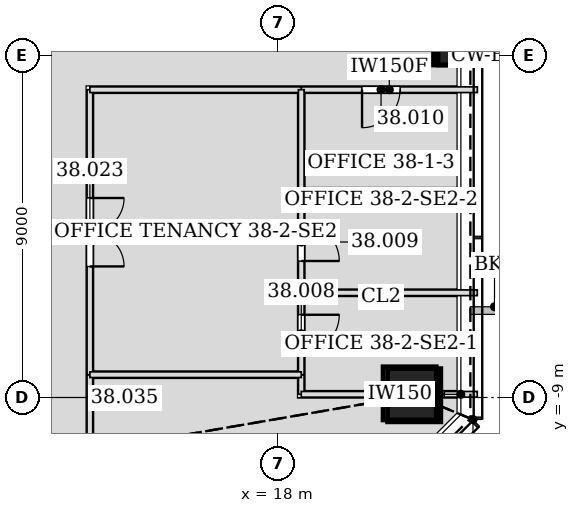
"""IFC4 building model, lengths in metres.
Left out: names, types, materials, properties, quantities, classifications, styles, units other than length and angle.
Written with IfcOpenShell. Run it as: python <this file> out.ifc"""

import sys

from ifc_helpers import new_model, si_unit, direction, frame, frame_2d, origin, origin_2d, place, context, subcontext, project, spatial, rectangle, hollow_rectangle, extrude, element, fill, save


model = new_model("IFC4")
c1 = context("Model", 3, precision=1e-05, world=origin(), true_north=direction((0.0, 1.0)))
c2 = subcontext(c1, "Body", "Model", "MODEL_VIEW")
j1 = project(units=[si_unit("LENGTHUNIT", "METRE"), si_unit("PLANEANGLEUNIT", "RADIAN")], contexts=[c1])
p1 = place(None, origin())
s1 = spatial("IfcSite", under=j1, at=p1, CompositionType="ELEMENT")
p2 = place(p1, origin())
s2 = spatial("IfcBuilding", under=s1, at=p2, CompositionType="ELEMENT")
p3 = place(p2, frame((0.0, 0.0, 168.0)))
s3 = spatial("IfcBuildingStorey", under=s2, at=p3, CompositionType="ELEMENT", Elevation=168.0)
p4 = place(p3, frame((21.584, -8.94, 0.0), z_axis=(-0.028237674468, 0.01173664659, 0.999532333078), x_axis=(-0.38380575713, -0.923413851312, 0.0)))
e1 = element("IfcColumn", 1, at=p4, inside=s3, PredefinedType="COLUMN", context=c2, shape_type="SweptSolid", body=[
    extrude(hollow_rectangle(XDim=1.4, YDim=1.4, WallThickness=0.065, at=origin_2d()), origin(), (0.0, 0.0, 1.0), 4.202),
])
p5 = place(p3, frame((22.462, 0.0, 0.0), z_axis=(-0.028239619523, 0.0, 0.999601182417), x_axis=(0.0, -1.0, 0.0)))
e2 = element("IfcColumn", 2, at=p5, inside=s3, PredefinedType="COLUMN", context=c2, shape_type="SweptSolid", body=[
    extrude(hollow_rectangle(XDim=0.5, YDim=0.5, WallThickness=0.025, at=origin_2d()), origin(), (0.0, 0.0, 1.0), 4.202),
])
p6 = place(p3, frame((18.611, -0.9, 0.0), z_axis=(0.0, 0.0, 1.0), x_axis=(1.0, 0.0, 0.0)))
e3 = element("IfcWall", 3, at=p6, inside=s3, PredefinedType="PARTITIONING", context=c2, shape_type="SweptSolid", body=[
    extrude(rectangle(XDim=4.635, YDim=0.15, at=frame_2d((2.317, 0.0))), origin(), (0.0, 0.0, 1.0), 3.492),
])
p7 = place(p6, frame((1.601, 0.0, 0.0)))
e4 = element("IfcOpeningElement", 4, at=p7, cuts=e3, PredefinedType="OPENING", context=c2, shape_type="SweptSolid", body=[
    extrude(rectangle(XDim=1.0, YDim=2.1, at=frame_2d((0.5, 1.05))), frame((0.0, 0.085, 0.0), z_axis=(0.0, -1.0, 0.0), x_axis=(1.0, 0.0, 0.0)), (0.0, 0.0, 1.0), 0.17),
])
p8 = place(p3, frame((13.05, -13.05, 0.0), z_axis=(0.0, 0.0, 1.0), x_axis=(0.0, 1.0, 0.0)))
e5 = element("IfcWall", 5, at=p8, inside=s3, PredefinedType="PARTITIONING", context=c2, shape_type="SweptSolid", body=[
    extrude(rectangle(XDim=4.651, YDim=0.15, at=frame_2d((2.326, 0.0))), origin(), (0.0, 0.0, 1.0), 3.098),
])
p9 = place(p3, frame((13.05, -8.401, 0.0), z_axis=(0.0, 0.0, 1.0), x_axis=(0.0, 1.0, 0.0)))
e6 = element("IfcWall", 6, at=p9, inside=s3, PredefinedType="PARTITIONING", context=c2, shape_type="SweptSolid", body=[
    extrude(rectangle(XDim=7.501, YDim=0.15, at=frame_2d((3.75, 0.0))), origin(), (0.0, 0.0, 1.0), 4.035),
])
p10 = place(p9, frame((2.851, 0.0, 0.0)))
e7 = element("IfcOpeningElement", 7, at=p10, cuts=e6, PredefinedType="OPENING", context=c2, shape_type="SweptSolid", body=[
    extrude(rectangle(XDim=1.8, YDim=2.4, at=frame_2d((0.9, 1.2))), frame((0.0, 0.085, 0.0), z_axis=(0.0, -1.0, 0.0), x_axis=(1.0, 0.0, 0.0)), (0.0, 0.0, 1.0), 0.17),
])
p11 = place(p3, frame((13.05, -0.9, 0.0), z_axis=(0.0, 0.0, 1.0), x_axis=(1.0, 0.0, 0.0)))
e8 = element("IfcWall", 8, at=p11, inside=s3, PredefinedType="PARTITIONING", context=c2, shape_type="SweptSolid", body=[
    extrude(rectangle(XDim=5.563, YDim=0.15, at=frame_2d((2.782, 0.0))), origin(), (0.0, 0.0, 1.0), 3.492),
])
p12 = place(p3, frame((23.244, -6.244, 0.0), z_axis=(0.0, 0.0, 1.0), x_axis=(-1.0, 0.0, 0.0)))
e9 = element("IfcWall", 9, at=p12, inside=s3, PredefinedType="PARTITIONING", context=c2, shape_type="SweptSolid", body=[
    extrude(rectangle(XDim=4.632, YDim=0.15, at=frame_2d((2.316, 0.0))), origin(), (0.0, 0.0, 1.0), 3.492),
])
p13 = place(p3, frame((18.612, -8.399, 0.0), z_axis=(0.0, 0.0, 1.0), x_axis=(0.0, -1.0, 0.0)))
e10 = element("IfcWall", 10, at=p13, inside=s3, PredefinedType="PARTITIONING", context=c2, shape_type="SweptSolid", body=[
    extrude(rectangle(XDim=0.517, YDim=0.15, at=frame_2d((0.259, 0.0))), origin(), (0.0, 0.0, 1.0), 4.035),
])
p14 = place(p3, frame((18.612, -8.916, 0.0), z_axis=(0.0, 0.0, 1.0), x_axis=(1.0, 0.0, 0.0)))
e11 = element("IfcWall", 11, at=p14, inside=s3, PredefinedType="PARTITIONING", context=c2, shape_type="SweptSolid", body=[
    extrude(rectangle(XDim=2.064, YDim=0.15, at=frame_2d((1.032, 0.0))), origin(), (0.0, 0.0, 1.0), 3.098),
])
p15 = place(p3, frame((22.373, -8.916, 0.0), z_axis=(0.0, 0.0, 1.0), x_axis=(1.0, 0.0, 0.0)))
e12 = element("IfcWall", 12, at=p15, inside=s3, PredefinedType="PARTITIONING", context=c2, shape_type="SweptSolid", body=[
    extrude(rectangle(XDim=0.871, YDim=0.15, at=frame_2d((0.436, 0.0))), origin(), (0.0, 0.0, 1.0), 4.035),
])
p16 = place(p3, frame((18.612, -8.401, 0.0), z_axis=(0.0, 0.0, 1.0), x_axis=(0.0, 1.0, 0.0)))
e13 = element("IfcWall", 13, at=p16, inside=s3, PredefinedType="PARTITIONING", context=c2, shape_type="SweptSolid", body=[
    extrude(rectangle(XDim=7.501, YDim=0.15, at=frame_2d((3.75, 0.0))), origin(), (0.0, 0.0, 1.0), 4.035),
])
p17 = place(p16, frame((0.579, 0.0, 0.0)))
e14 = element("IfcOpeningElement", 14, at=p17, cuts=e13, PredefinedType="OPENING", context=c2, shape_type="SweptSolid", body=[
    extrude(rectangle(XDim=1.0, YDim=2.1, at=frame_2d((0.5, 1.05))), frame((0.0, 0.085, 0.0), z_axis=(0.0, -1.0, 0.0), x_axis=(1.0, 0.0, 0.0)), (0.0, 0.0, 1.0), 0.17),
])
p18 = place(p16, frame((2.993, 0.0, 0.0)))
e15 = element("IfcOpeningElement", 15, at=p18, cuts=e13, PredefinedType="OPENING", context=c2, shape_type="SweptSolid", body=[
    extrude(rectangle(XDim=1.0, YDim=2.1, at=frame_2d((0.5, 1.05))), frame((0.0, 0.085, 0.0), z_axis=(0.0, -1.0, 0.0), x_axis=(1.0, 0.0, 0.0)), (0.0, 0.0, 1.0), 0.17),
])
p19 = place(p3, frame((23.244, -3.572, 0.0), z_axis=(0.0, 0.0, 1.0), x_axis=(-1.0, 0.0, 0.0)))
e16 = element("IfcWall", 16, at=p19, inside=s3, PredefinedType="PARTITIONING", context=c2, shape_type="SweptSolid", body=[
    extrude(rectangle(XDim=4.632, YDim=0.15, at=frame_2d((2.316, 0.0))), origin(), (0.0, 0.0, 1.0), 3.492),
])
p20 = place(p3, frame((18.612, -8.4, 0.0), z_axis=(0.0, 0.0, 1.0), x_axis=(-1.0, 0.0, 0.0)))
e17 = element("IfcWall", 17, at=p20, inside=s3, PredefinedType="PARTITIONING", context=c2, shape_type="SweptSolid", body=[
    extrude(rectangle(XDim=5.562, YDim=0.15, at=frame_2d((2.781, 0.0))), origin(), (0.0, 0.0, 1.0), 3.492),
])
p21 = place(p17, frame((1.0, 0.0, 0.0), z_axis=(0.0, 0.0, 1.0), x_axis=(-1.0, 0.0, 0.0)))
e18 = element("IfcDoor", 18, at=p21, inside=s3, OperationType="SINGLE_SWING_LEFT", PredefinedType="DOOR", context=c2, shape_type="SweptSolid", body=[
    extrude(rectangle(XDim=1.0, YDim=2.1, at=frame_2d((0.5, 1.05))), frame((0.0, 0.025, 0.0), z_axis=(0.0, -1.0, 0.0), x_axis=(1.0, 0.0, 0.0)), (0.0, 0.0, 1.0), 0.05),
])
fill(e14, e18)
p22 = place(p18, frame((1.0, 0.0, 0.0), z_axis=(0.0, 0.0, 1.0), x_axis=(-1.0, 0.0, 0.0)))
e19 = element("IfcDoor", 19, at=p22, inside=s3, OperationType="SINGLE_SWING_RIGHT", PredefinedType="DOOR", context=c2, shape_type="SweptSolid", body=[
    extrude(rectangle(XDim=1.0, YDim=2.1, at=frame_2d((0.5, 1.05))), frame((0.0, 0.025, 0.0), z_axis=(0.0, -1.0, 0.0), x_axis=(1.0, 0.0, 0.0)), (0.0, 0.0, 1.0), 0.05),
])
fill(e15, e19)
p23 = place(p7, frame((1.0, 0.0, 0.0), z_axis=(0.0, 0.0, 1.0), x_axis=(-1.0, 0.0, 0.0)))
e20 = element("IfcDoor", 20, at=p23, inside=s3, OperationType="SINGLE_SWING_RIGHT", PredefinedType="DOOR", context=c2, shape_type="SweptSolid", body=[
    extrude(rectangle(XDim=1.0, YDim=2.1, at=frame_2d((0.5, 1.05))), frame((0.0, 0.025, 0.0), z_axis=(0.0, -1.0, 0.0), x_axis=(1.0, 0.0, 0.0)), (0.0, 0.0, 1.0), 0.05),
])
fill(e4, e20)
p24 = place(p10, frame((1.8, 0.0, 0.0), z_axis=(0.0, 0.0, 1.0), x_axis=(-1.0, 0.0, 0.0)))
e21 = element("IfcDoor", 21, at=p24, inside=s3, OperationType="DOUBLE_DOOR_SINGLE_SWING", PredefinedType="DOOR", context=c2, shape_type="SweptSolid", body=[
    extrude(rectangle(XDim=1.8, YDim=2.4, at=frame_2d((0.9, 1.2))), frame((0.0, 0.025, 0.0), z_axis=(0.0, -1.0, 0.0), x_axis=(1.0, 0.0, 0.0)), (0.0, 0.0, 1.0), 0.05),
])
fill(e7, e21)
save(model, sys.argv[1])
